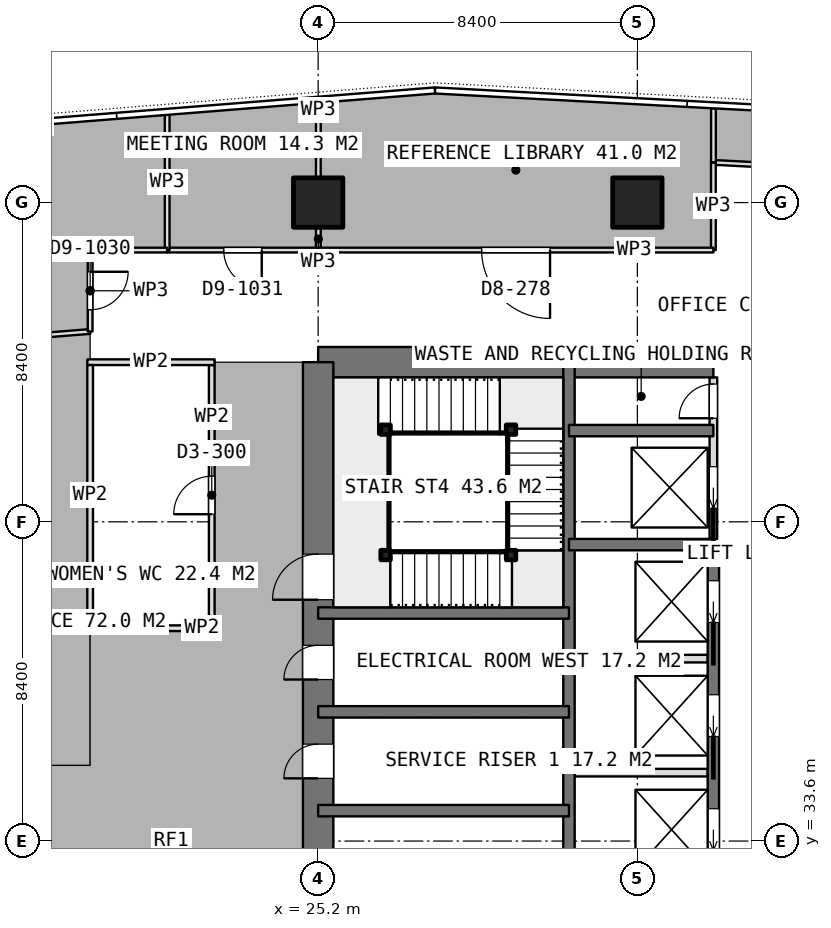
"""IFC4 building model, lengths in metres.
Left out: names, types, materials, properties, quantities, classifications, styles, units other than length and angle.
Written with IfcOpenShell. Run it as: python <this file> out.ifc"""

import sys

from ifc_helpers import new_model, si_unit, direction, frame, frame_2d, origin, origin_2d, place, context, subcontext, project, spatial, rectangle, extrude, element, fill, save


model = new_model("IFC4")
c1 = context("Model", 3, precision=1e-05, world=origin(), true_north=direction((0.0, 1.0)))
c2 = subcontext(c1, "Body", "Model", "MODEL_VIEW")
j1 = project(units=[si_unit("LENGTHUNIT", "METRE"), si_unit("PLANEANGLEUNIT", "RADIAN")], contexts=[c1])
p1 = place(None, origin())
s1 = spatial("IfcSite", under=j1, at=p1, CompositionType="ELEMENT")
p2 = place(p1, origin())
s2 = spatial("IfcBuilding", under=s1, at=p2, CompositionType="ELEMENT")
p3 = place(p2, frame((0.0, 0.0, 276.35)))
s3 = spatial("IfcBuildingStorey", under=s2, at=p3, CompositionType="ELEMENT", Elevation=276.35)
p4 = place(p3, frame((25.2, 46.2, 0.0), z_axis=(0.0, 0.0, 1.0), x_axis=(1.0, 0.0, 0.0)))
e1 = element("IfcWall", 1, at=p4, inside=s3, PredefinedType="SHEAR", context=c2, shape_type="SweptSolid", body=[
    extrude(rectangle(XDim=10.4, YDim=0.8, at=frame_2d((5.2, 0.0))), origin(), (0.0, 0.0, 1.0), 3.75),
])
p5 = place(p3, frame((25.2, 21.0, 0.0), z_axis=(0.0, 0.0, 1.0), x_axis=(0.0, 1.0, 0.0)))
e2 = element("IfcWall", 2, at=p5, inside=s3, PredefinedType="SHEAR", context=c2, shape_type="SweptSolid", body=[
    extrude(rectangle(XDim=25.2, YDim=0.8, at=frame_2d((12.6, 0.0))), origin(), (0.0, 0.0, 1.0), 3.75),
])
p6 = place(p5, frame((7.8, 0.0, 0.0)))
e3 = element("IfcOpeningElement", 3, at=p6, cuts=e2, PredefinedType="OPENING", context=c2, shape_type="SweptSolid", body=[
    extrude(rectangle(XDim=1.2, YDim=2.1, at=frame_2d((0.6, 1.05))), frame((0.0, 0.41, 0.0), z_axis=(0.0, -1.0, 0.0), x_axis=(1.0, 0.0, 0.0)), (0.0, 0.0, 1.0), 0.82),
])
p7 = place(p5, frame((14.25, 0.0, 0.0)))
e4 = element("IfcOpeningElement", 4, at=p7, cuts=e2, PredefinedType="OPENING", context=c2, shape_type="SweptSolid", body=[
    extrude(rectangle(XDim=0.9, YDim=2.1, at=frame_2d((0.45, 1.05))), frame((0.0, 0.41, 0.0), z_axis=(0.0, -1.0, 0.0), x_axis=(1.0, 0.0, 0.0)), (0.0, 0.0, 1.0), 0.82),
])
p8 = place(p5, frame((16.85, 0.0, 0.0)))
e5 = element("IfcOpeningElement", 5, at=p8, cuts=e2, PredefinedType="OPENING", context=c2, shape_type="SweptSolid", body=[
    extrude(rectangle(XDim=0.9, YDim=2.1, at=frame_2d((0.45, 1.05))), frame((0.0, 0.41, 0.0), z_axis=(0.0, -1.0, 0.0), x_axis=(1.0, 0.0, 0.0)), (0.0, 0.0, 1.0), 0.82),
])
p9 = place(p5, frame((18.95, 0.0, 0.0)))
e6 = element("IfcOpeningElement", 6, at=p9, cuts=e2, PredefinedType="OPENING", context=c2, shape_type="SweptSolid", body=[
    extrude(rectangle(XDim=1.2, YDim=2.1, at=frame_2d((0.6, 1.05))), frame((0.0, 0.41, 0.0), z_axis=(0.0, -1.0, 0.0), x_axis=(1.0, 0.0, 0.0)), (0.0, 0.0, 1.0), 0.82),
])
p10 = place(p3, frame((31.8, 21.0, 0.0), z_axis=(0.0, 0.0, 1.0), x_axis=(0.0, 1.0, 0.0)))
e7 = element("IfcWall", 7, at=p10, inside=s3, PredefinedType="SHEAR", context=c2, shape_type="SweptSolid", body=[
    extrude(rectangle(XDim=25.2, YDim=0.3, at=frame_2d((12.6, 0.0))), origin(), (0.0, 0.0, 1.0), 3.75),
])
p11 = place(p3, frame((35.6, 23.4, 0.0), z_axis=(0.0, 0.0, 1.0), x_axis=(0.0, 1.0, 0.0)))
e8 = element("IfcWall", 8, at=p11, inside=s3, PredefinedType="SHEAR", context=c2, shape_type="SweptSolid", body=[
    extrude(rectangle(XDim=18.0, YDim=0.3, at=frame_2d((9.0, 0.0))), origin(), (0.0, 0.0, 1.0), 3.75),
])
p12 = place(p11, frame((0.95, 0.0, 0.0)))
e9 = element("IfcOpeningElement", 9, at=p12, cuts=e8, PredefinedType="OPENING", context=c2, shape_type="SweptSolid", body=[
    extrude(rectangle(XDim=1.1, YDim=2.1, at=frame_2d((0.55, 1.05))), frame((0.0, 0.16, 0.0), z_axis=(0.0, -1.0, 0.0), x_axis=(1.0, 0.0, 0.0)), (0.0, 0.0, 1.0), 0.32),
])
p13 = place(p11, frame((3.95, 0.0, 0.0)))
e10 = element("IfcOpeningElement", 10, at=p13, cuts=e8, PredefinedType="OPENING", context=c2, shape_type="SweptSolid", body=[
    extrude(rectangle(XDim=1.1, YDim=2.1, at=frame_2d((0.55, 1.05))), frame((0.0, 0.16, 0.0), z_axis=(0.0, -1.0, 0.0), x_axis=(1.0, 0.0, 0.0)), (0.0, 0.0, 1.0), 0.32),
])
p14 = place(p11, frame((6.95, 0.0, 0.0)))
e11 = element("IfcOpeningElement", 11, at=p14, cuts=e8, PredefinedType="OPENING", context=c2, shape_type="SweptSolid", body=[
    extrude(rectangle(XDim=1.1, YDim=2.1, at=frame_2d((0.55, 1.05))), frame((0.0, 0.16, 0.0), z_axis=(0.0, -1.0, 0.0), x_axis=(1.0, 0.0, 0.0)), (0.0, 0.0, 1.0), 0.32),
])
p15 = place(p11, frame((9.95, 0.0, 0.0)))
e12 = element("IfcOpeningElement", 12, at=p15, cuts=e8, PredefinedType="OPENING", context=c2, shape_type="SweptSolid", body=[
    extrude(rectangle(XDim=1.1, YDim=2.1, at=frame_2d((0.55, 1.05))), frame((0.0, 0.16, 0.0), z_axis=(0.0, -1.0, 0.0), x_axis=(1.0, 0.0, 0.0)), (0.0, 0.0, 1.0), 0.32),
])
p16 = place(p11, frame((12.95, 0.0, 0.0)))
e13 = element("IfcOpeningElement", 13, at=p16, cuts=e8, PredefinedType="OPENING", context=c2, shape_type="SweptSolid", body=[
    extrude(rectangle(XDim=1.1, YDim=2.1, at=frame_2d((0.55, 1.05))), frame((0.0, 0.16, 0.0), z_axis=(0.0, -1.0, 0.0), x_axis=(1.0, 0.0, 0.0)), (0.0, 0.0, 1.0), 0.32),
])
p17 = place(p11, frame((15.95, 0.0, 0.0)))
e14 = element("IfcOpeningElement", 14, at=p17, cuts=e8, PredefinedType="OPENING", context=c2, shape_type="SweptSolid", body=[
    extrude(rectangle(XDim=1.1, YDim=2.1, at=frame_2d((0.55, 1.05))), frame((0.0, 0.16, 0.0), z_axis=(0.0, -1.0, 0.0), x_axis=(1.0, 0.0, 0.0)), (0.0, 0.0, 1.0), 0.32),
])
for number, where, z_axis, x_axis in (
    (15, (31.8, 41.4, 0.0), (0.0, 0.0, 1.0), (1.0, 0.0, 0.0)),
    (16, (31.8, 44.4, 0.0), (0.0, 0.0, 1.0), (1.0, 0.0, 0.0)),
):
    element("IfcWall", number, at=place(p3, frame(where, z_axis=z_axis, x_axis=x_axis)), inside=s3, PredefinedType="SHEAR", context=c2, shape_type="SweptSolid", body=[
        extrude(rectangle(XDim=3.8, YDim=0.3, at=frame_2d((1.9, 0.0))), origin(), (0.0, 0.0, 1.0), 3.75),
    ])
for number, where, z_axis, x_axis in (
    (17, (25.2, 34.4, 0.0), (0.0, 0.0, 1.0), (1.0, 0.0, 0.0)),
    (18, (25.2, 37.0, 0.0), (0.0, 0.0, 1.0), (1.0, 0.0, 0.0)),
    (19, (25.2, 39.6, 0.0), (0.0, 0.0, 1.0), (1.0, 0.0, 0.0)),
):
    element("IfcWall", number, at=place(p3, frame(where, z_axis=z_axis, x_axis=x_axis)), inside=s3, PredefinedType="SHEAR", context=c2, shape_type="SweptSolid", body=[
        extrude(rectangle(XDim=6.6, YDim=0.3, at=frame_2d((3.3, 0.0))), origin(), (0.0, 0.0, 1.0), 3.75),
    ])
for number, where, z_axis, x_axis in (
    (20, (25.2, 50.4, 0.0), (0.0, 0.0, 1.0), (1.0, 0.0, 0.0)),
    (21, (33.6, 50.4, 0.0), (0.0, 0.0, 1.0), (1.0, 0.0, 0.0)),
):
    element("IfcColumn", number, at=place(p3, frame(where, z_axis=z_axis, x_axis=x_axis)), inside=s3, PredefinedType="COLUMN", context=c2, shape_type="SweptSolid", body=[
        extrude(rectangle(XDim=1.3, YDim=1.3, at=origin_2d()), origin(), (0.0, 0.0, 1.0), 3.75),
    ])
for number, where, z_axis, x_axis in (
    (22, (31.95, 35.4, 0.0), (0.0, 0.0, 1.0), (1.0, 0.0, 0.0)),
    (23, (31.95, 38.4, 0.0), (0.0, 0.0, 1.0), (1.0, 0.0, 0.0)),
):
    element("IfcWall", number, at=place(p3, frame(where, z_axis=z_axis, x_axis=x_axis)), inside=s3, PredefinedType="PARTITIONING", context=c2, shape_type="SweptSolid", body=[
        extrude(rectangle(XDim=3.5, YDim=0.2, at=frame_2d((1.75, 0.0))), origin(), (0.0, 0.0, 1.0), 3.5),
    ])
p18 = place(p3, frame((35.6, 41.55, 0.0), z_axis=(0.0, 0.0, 1.0), x_axis=(0.0, 1.0, 0.0)))
e24 = element("IfcWall", 24, at=p18, inside=s3, PredefinedType="PARTITIONING", context=c2, shape_type="SweptSolid", body=[
    extrude(rectangle(XDim=4.25, YDim=0.2, at=frame_2d((2.125, 0.0))), origin(), (0.0, 0.0, 1.0), 3.5),
])
p19 = place(p18, frame((3.175, 0.0, 0.0)))
e25 = element("IfcOpeningElement", 25, at=p19, cuts=e24, PredefinedType="OPENING", context=c2, shape_type="SweptSolid", body=[
    extrude(rectangle(XDim=0.9, YDim=2.1, at=frame_2d((0.45, 1.05))), frame((0.0, 0.11, 0.0), z_axis=(0.0, -1.0, 0.0), x_axis=(1.0, 0.0, 0.0)), (0.0, 0.0, 1.0), 0.22),
])
p20 = place(p18, frame((0.8, 0.0, 0.0)))
e26 = element("IfcOpeningElement", 26, at=p20, cuts=e24, PredefinedType="OPENING", context=c2, shape_type="SweptSolid", body=[
    extrude(rectangle(XDim=1.1, YDim=2.1, at=frame_2d((0.55, 1.05))), frame((0.0, 0.11, 0.0), z_axis=(0.0, -1.0, 0.0), x_axis=(1.0, 0.0, 0.0)), (0.0, 0.0, 1.0), 0.22),
])
for number, where, z_axis, x_axis in (
    (27, (19.125, 39.2, 0.0), (0.0, 0.0, 1.0), (1.0, 0.0, 0.0)),
    (28, (19.125, 46.2, 0.0), (0.0, 0.0, 1.0), (1.0, 0.0, 0.0)),
):
    element("IfcWall", number, at=place(p3, frame(where, z_axis=z_axis, x_axis=x_axis)), inside=s3, PredefinedType="PARTITIONING", context=c2, shape_type="SweptSolid", body=[
        extrude(rectangle(XDim=3.35, YDim=0.15, at=frame_2d((1.675, 0.0))), origin(), (0.0, 0.0, 1.0), 3.5),
    ])
p21 = place(p3, frame((19.2, 39.275, 0.0), z_axis=(0.0, 0.0, 1.0), x_axis=(0.0, 1.0, 0.0)))
e29 = element("IfcWall", 29, at=p21, inside=s3, PredefinedType="PARTITIONING", context=c2, shape_type="SweptSolid", body=[
    extrude(rectangle(XDim=6.85, YDim=0.15, at=frame_2d((3.425, 0.0))), origin(), (0.0, 0.0, 1.0), 3.5),
])
p22 = place(p3, frame((22.4, 39.275, 0.0), z_axis=(0.0, 0.0, 1.0), x_axis=(0.0, 1.0, 0.0)))
e30 = element("IfcWall", 30, at=p22, inside=s3, PredefinedType="PARTITIONING", context=c2, shape_type="SweptSolid", body=[
    extrude(rectangle(XDim=6.85, YDim=0.15, at=frame_2d((3.425, 0.0))), origin(), (0.0, 0.0, 1.0), 3.5),
])
p23 = place(p22, frame((2.925, 0.0, 0.0)))
e31 = element("IfcOpeningElement", 31, at=p23, cuts=e30, PredefinedType="OPENING", context=c2, shape_type="SweptSolid", body=[
    extrude(rectangle(XDim=1.0, YDim=2.1, at=frame_2d((0.5, 1.05))), frame((0.0, 0.085, 0.0), z_axis=(0.0, -1.0, 0.0), x_axis=(1.0, 0.0, 0.0)), (0.0, 0.0, 1.0), 0.17),
])
p24 = place(p3, frame((35.602, 51.458, 0.0), z_axis=(0.0, 0.0, 1.0), x_axis=(0.0, 1.0, 0.0)))
e32 = element("IfcWall", 32, at=p24, inside=s3, PredefinedType="PARTITIONING", context=c2, shape_type="SweptSolid", body=[
    extrude(rectangle(XDim=1.422, YDim=0.125, at=frame_2d((0.711, 0.0))), origin(), (0.0, 0.0, 1.0), 3.5),
])
p25 = place(p3, frame((40.0, 51.225, 0.0), z_axis=(0.0, 0.0, 1.0), x_axis=(-0.998600625097, 0.052884700585, 0.0)))
e33 = element("IfcWall", 33, at=p25, inside=s3, PredefinedType="PARTITIONING", context=c2, shape_type="SweptSolid", body=[
    extrude(rectangle(XDim=4.404, YDim=0.125, at=frame_2d((2.202, 0.0))), origin(), (0.0, 0.0, 1.0), 3.5),
])
p26 = place(p3, frame((25.205, 53.025, 0.0), z_axis=(0.0, 0.0, 1.0), x_axis=(0.0, -1.0, 0.0)))
e34 = element("IfcWall", 34, at=p26, inside=s3, PredefinedType="PARTITIONING", context=c2, shape_type="SweptSolid", body=[
    extrude(rectangle(XDim=1.955, YDim=0.125, at=frame_2d((0.978, 0.0))), origin(), (0.0, 0.0, 1.0), 3.5),
])
p27 = place(p3, frame((25.205, 49.73, 0.0), z_axis=(0.0, 0.0, 1.0), x_axis=(0.0, -1.0, 0.0)))
e35 = element("IfcWall", 35, at=p27, inside=s3, PredefinedType="PARTITIONING", context=c2, shape_type="SweptSolid", body=[
    extrude(rectangle(XDim=0.58, YDim=0.125, at=frame_2d((0.29, 0.0))), origin(), (0.0, 0.0, 1.0), 3.5),
])
p28 = place(p3, frame((25.205, 49.15, 0.0), z_axis=(0.0, 0.0, 1.0), x_axis=(-1.0, 0.0, 0.0)))
e36 = element("IfcWall", 36, at=p28, inside=s3, PredefinedType="PARTITIONING", context=c2, shape_type="SweptSolid", body=[
    extrude(rectangle(XDim=3.978, YDim=0.125, at=frame_2d((1.989, 0.0))), origin(), (0.0, 0.0, 1.0), 3.5),
])
p29 = place(p28, frame((1.489, 0.0, 0.0)))
e37 = element("IfcOpeningElement", 37, at=p29, cuts=e36, PredefinedType="OPENING", context=c2, shape_type="SweptSolid", body=[
    extrude(rectangle(XDim=1.0, YDim=2.1, at=frame_2d((0.5, 1.05))), frame((0.0, 0.073, 0.0), z_axis=(0.0, -1.0, 0.0), x_axis=(1.0, 0.0, 0.0)), (0.0, 0.0, 1.0), 0.145),
])
p30 = place(p3, frame((21.227, 49.15, 0.0), z_axis=(0.0, 0.0, 1.0), x_axis=(0.0, 1.0, 0.0)))
e38 = element("IfcWall", 38, at=p30, inside=s3, PredefinedType="PARTITIONING", context=c2, shape_type="SweptSolid", body=[
    extrude(rectangle(XDim=3.558, YDim=0.125, at=frame_2d((1.779, 0.0))), origin(), (0.0, 0.0, 1.0), 3.5),
])
p31 = place(p3, frame((19.2, 47.008, 0.0), z_axis=(0.0, 0.0, 1.0), x_axis=(-0.996842300725, -0.079406721921, 0.0)))
e39 = element("IfcWall", 39, at=p31, inside=s3, PredefinedType="PARTITIONING", context=c2, shape_type="SweptSolid", body=[
    extrude(rectangle(XDim=6.02, YDim=0.125, at=frame_2d((3.01, 0.0))), origin(), (0.0, 0.0, 1.0), 3.5),
])
p32 = place(p3, frame((21.226, 49.15, 0.0), z_axis=(0.0, 0.0, 1.0), x_axis=(-1.0, 0.0, 0.0)))
e40 = element("IfcWall", 40, at=p32, inside=s3, PredefinedType="PARTITIONING", context=c2, shape_type="SweptSolid", body=[
    extrude(rectangle(XDim=2.026, YDim=0.125, at=frame_2d((1.013, 0.0))), origin(), (0.0, 0.0, 1.0), 3.5),
])
p33 = place(p3, frame((19.2, 49.15, 0.0), z_axis=(0.0, 0.0, 1.0), x_axis=(0.0, -1.0, 0.0)))
e41 = element("IfcWall", 41, at=p33, inside=s3, PredefinedType="PARTITIONING", context=c2, shape_type="SweptSolid", body=[
    extrude(rectangle(XDim=2.142, YDim=0.125, at=frame_2d((1.071, 0.0))), origin(), (0.0, 0.0, 1.0), 3.5),
])
p34 = place(p33, frame((0.571, 0.0, 0.0)))
e42 = element("IfcOpeningElement", 42, at=p34, cuts=e41, PredefinedType="OPENING", context=c2, shape_type="SweptSolid", body=[
    extrude(rectangle(XDim=1.0, YDim=2.1, at=frame_2d((0.5, 1.05))), frame((0.0, 0.073, 0.0), z_axis=(0.0, -1.0, 0.0), x_axis=(1.0, 0.0, 0.0)), (0.0, 0.0, 1.0), 0.145),
])
p35 = place(p3, frame((35.6, 51.458, 0.0), z_axis=(0.0, 0.0, 1.0), x_axis=(0.0, -1.0, 0.0)))
e43 = element("IfcWall", 43, at=p35, inside=s3, PredefinedType="PARTITIONING", context=c2, shape_type="SweptSolid", body=[
    extrude(rectangle(XDim=2.308, YDim=0.125, at=frame_2d((1.154, 0.0))), origin(), (0.0, 0.0, 1.0), 3.5),
])
p36 = place(p3, frame((35.6, 49.15, 0.0), z_axis=(0.0, 0.0, 1.0), x_axis=(-1.0, 0.0, 0.0)))
e44 = element("IfcWall", 44, at=p36, inside=s3, PredefinedType="PARTITIONING", context=c2, shape_type="SweptSolid", body=[
    extrude(rectangle(XDim=10.395, YDim=0.125, at=frame_2d((5.198, 0.0))), origin(), (0.0, 0.0, 1.0), 3.5),
])
p37 = place(p36, frame((4.298, 0.0, 0.0)))
e45 = element("IfcOpeningElement", 45, at=p37, cuts=e44, PredefinedType="OPENING", context=c2, shape_type="SweptSolid", body=[
    extrude(rectangle(XDim=1.8, YDim=2.1, at=frame_2d((0.9, 1.05))), frame((0.0, 0.073, 0.0), z_axis=(0.0, -1.0, 0.0), x_axis=(1.0, 0.0, 0.0)), (0.0, 0.0, 1.0), 0.145),
])
for number, where, z_axis, x_axis in (
    (46, (26.975, 41.125, 0.0), (0.0, 0.0, 1.0), (1.0, 0.0, 0.0)),
    (47, (30.275, 41.125, 0.0), (0.0, 0.0, 1.0), (1.0, 0.0, 0.0)),
    (48, (30.275, 44.425, 0.0), (0.0, 0.0, 1.0), (1.0, 0.0, 0.0)),
    (49, (26.975, 44.425, 0.0), (0.0, 0.0, 1.0), (1.0, 0.0, 0.0)),
):
    element("IfcColumn", number, at=place(p3, frame(where, z_axis=z_axis, x_axis=x_axis)), inside=s3, PredefinedType="COLUMN", context=c2, shape_type="SweptSolid", body=[
        extrude(rectangle(XDim=0.25, YDim=0.25, at=origin_2d()), origin(), (0.0, 0.0, 1.0), 3.75),
    ])
p38 = place(p7, origin())
e50 = element("IfcDoor", 50, at=p38, inside=s3, OperationType="SINGLE_SWING_LEFT", PredefinedType="DOOR", context=c2, shape_type="SweptSolid", body=[
    extrude(rectangle(XDim=0.9, YDim=2.1, at=frame_2d((0.45, 1.05))), frame((0.0, 0.025, 0.0), z_axis=(0.0, -1.0, 0.0), x_axis=(1.0, 0.0, 0.0)), (0.0, 0.0, 1.0), 0.05),
])
fill(e4, e50)
p39 = place(p8, origin())
e51 = element("IfcDoor", 51, at=p39, inside=s3, OperationType="SINGLE_SWING_LEFT", PredefinedType="DOOR", context=c2, shape_type="SweptSolid", body=[
    extrude(rectangle(XDim=0.9, YDim=2.1, at=frame_2d((0.45, 1.05))), frame((0.0, 0.025, 0.0), z_axis=(0.0, -1.0, 0.0), x_axis=(1.0, 0.0, 0.0)), (0.0, 0.0, 1.0), 0.05),
])
fill(e5, e51)
p40 = place(p19, origin())
e52 = element("IfcDoor", 52, at=p40, inside=s3, OperationType="SINGLE_SWING_LEFT", PredefinedType="DOOR", context=c2, shape_type="SweptSolid", body=[
    extrude(rectangle(XDim=0.9, YDim=2.1, at=frame_2d((0.45, 1.05))), frame((0.0, 0.025, 0.0), z_axis=(0.0, -1.0, 0.0), x_axis=(1.0, 0.0, 0.0)), (0.0, 0.0, 1.0), 0.05),
])
fill(e25, e52)
p41 = place(p15, origin())
e53 = element("IfcDoor", 53, at=p41, inside=s3, OperationType="SLIDING_TO_LEFT", PredefinedType="USERDEFINED", context=c2, shape_type="SweptSolid", body=[
    extrude(rectangle(XDim=1.1, YDim=2.1, at=frame_2d((0.55, 1.05))), frame((0.0, 0.025, 0.0), z_axis=(0.0, -1.0, 0.0), x_axis=(1.0, 0.0, 0.0)), (0.0, 0.0, 1.0), 0.05),
])
fill(e12, e53)
p42 = place(p16, origin())
e54 = element("IfcDoor", 54, at=p42, inside=s3, OperationType="SLIDING_TO_LEFT", PredefinedType="USERDEFINED", context=c2, shape_type="SweptSolid", body=[
    extrude(rectangle(XDim=1.1, YDim=2.1, at=frame_2d((0.55, 1.05))), frame((0.0, 0.025, 0.0), z_axis=(0.0, -1.0, 0.0), x_axis=(1.0, 0.0, 0.0)), (0.0, 0.0, 1.0), 0.05),
])
fill(e13, e54)
p43 = place(p17, origin())
e55 = element("IfcDoor", 55, at=p43, inside=s3, OperationType="SLIDING_TO_LEFT", PredefinedType="USERDEFINED", context=c2, shape_type="SweptSolid", body=[
    extrude(rectangle(XDim=1.1, YDim=2.1, at=frame_2d((0.55, 1.05))), frame((0.0, 0.025, 0.0), z_axis=(0.0, -1.0, 0.0), x_axis=(1.0, 0.0, 0.0)), (0.0, 0.0, 1.0), 0.05),
])
fill(e14, e55)
p44 = place(p20, origin())
e56 = element("IfcDoor", 56, at=p44, inside=s3, OperationType="SLIDING_TO_LEFT", PredefinedType="USERDEFINED", context=c2, shape_type="SweptSolid", body=[
    extrude(rectangle(XDim=1.1, YDim=2.1, at=frame_2d((0.55, 1.05))), frame((0.0, 0.025, 0.0), z_axis=(0.0, -1.0, 0.0), x_axis=(1.0, 0.0, 0.0)), (0.0, 0.0, 1.0), 0.05),
])
fill(e26, e56)
p45 = place(p23, origin())
e57 = element("IfcDoor", 57, at=p45, inside=s3, OperationType="SINGLE_SWING_LEFT", PredefinedType="DOOR", context=c2, shape_type="SweptSolid", body=[
    extrude(rectangle(XDim=1.0, YDim=2.1, at=frame_2d((0.5, 1.05))), frame((0.0, 0.025, 0.0), z_axis=(0.0, -1.0, 0.0), x_axis=(1.0, 0.0, 0.0)), (0.0, 0.0, 1.0), 0.05),
])
fill(e31, e57)
p46 = place(p29, origin())
e58 = element("IfcDoor", 58, at=p46, inside=s3, OperationType="SINGLE_SWING_LEFT", PredefinedType="DOOR", context=c2, shape_type="SweptSolid", body=[
    extrude(rectangle(XDim=1.0, YDim=2.1, at=frame_2d((0.5, 1.05))), frame((0.0, 0.025, 0.0), z_axis=(0.0, -1.0, 0.0), x_axis=(1.0, 0.0, 0.0)), (0.0, 0.0, 1.0), 0.05),
])
fill(e37, e58)
p47 = place(p34, origin())
e59 = element("IfcDoor", 59, at=p47, inside=s3, OperationType="SINGLE_SWING_LEFT", PredefinedType="DOOR", context=c2, shape_type="SweptSolid", body=[
    extrude(rectangle(XDim=1.0, YDim=2.1, at=frame_2d((0.5, 1.05))), frame((0.0, 0.025, 0.0), z_axis=(0.0, -1.0, 0.0), x_axis=(1.0, 0.0, 0.0)), (0.0, 0.0, 1.0), 0.05),
])
fill(e42, e59)
p48 = place(p37, origin())
e60 = element("IfcDoor", 60, at=p48, inside=s3, OperationType="DOUBLE_DOOR_SINGLE_SWING", PredefinedType="DOOR", context=c2, shape_type="SweptSolid", body=[
    extrude(rectangle(XDim=1.8, YDim=2.1, at=frame_2d((0.9, 1.05))), frame((0.0, 0.025, 0.0), z_axis=(0.0, -1.0, 0.0), x_axis=(1.0, 0.0, 0.0)), (0.0, 0.0, 1.0), 0.05),
])
fill(e45, e60)
p49 = place(p9, origin())
e61 = element("IfcDoor", 61, at=p49, inside=s3, OperationType="SINGLE_SWING_RIGHT", PredefinedType="DOOR", context=c2, shape_type="SweptSolid", body=[
    extrude(rectangle(XDim=1.2, YDim=2.1, at=frame_2d((0.6, 1.05))), frame((0.0, 0.025, 0.0), z_axis=(0.0, -1.0, 0.0), x_axis=(1.0, 0.0, 0.0)), (0.0, 0.0, 1.0), 0.05),
])
fill(e6, e61)
save(model, sys.argv[1])
